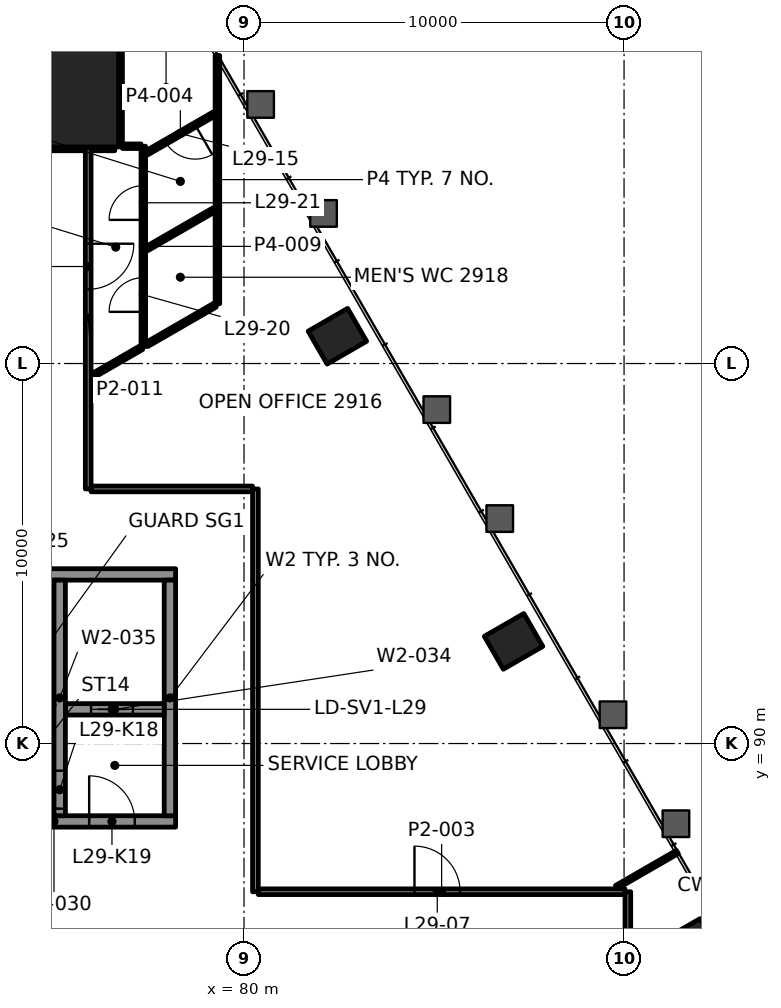
"""IFC4 building model, lengths in metres.
Left out: names, types, materials, properties, quantities, classifications, styles, units other than length and angle.
Written with IfcOpenShell. Run it as: python <this file> out.ifc"""

import sys

from ifc_helpers import new_model, si_unit, direction, frame, frame_2d, origin, origin_2d, place, context, subcontext, project, spatial, rectangle, extrude, element, fill, save


model = new_model("IFC4")
c1 = context("Model", 3, precision=1e-05, world=origin(), true_north=direction((0.0, 1.0)))
c2 = subcontext(c1, "Body", "Model", "MODEL_VIEW")
j1 = project(units=[si_unit("LENGTHUNIT", "METRE"), si_unit("PLANEANGLEUNIT", "RADIAN")], contexts=[c1])
p1 = place(None, origin())
s1 = spatial("IfcSite", under=j1, at=p1, CompositionType="ELEMENT")
p2 = place(p1, origin())
s2 = spatial("IfcBuilding", under=s1, at=p2, CompositionType="ELEMENT")
p3 = place(p2, frame((0.0, 0.0, 128.2)))
s3 = spatial("IfcBuildingStorey", under=s2, at=p3, CompositionType="ELEMENT", Elevation=128.2)
p4 = place(p3, frame((75.0, 107.399, 0.0), z_axis=(0.0, 0.0, 1.0), x_axis=(-1.0, 0.0, 0.0)))
e1 = element("IfcColumn", 1, at=p4, inside=s3, PredefinedType="COLUMN", context=c2, shape_type="SweptSolid", body=[
    extrude(rectangle(XDim=3.4, YDim=3.4, at=origin_2d()), origin(), (0.0, 0.0, 1.0), 4.2),
])
for number, where, z_axis, x_axis in (
    (2, (91.729, 84.658, -0.0), (0.0, 0.0, 1.0), (-0.5, 0.866, 0.0)),
    (3, (87.093, 92.688, -0.0), (0.0, 0.0, 1.0), (-0.5, 0.866, 0.0)),
    (4, (82.457, 100.719, -0.0), (0.0, 0.0, 1.0), (-0.5, 0.866, 0.0)),
):
    element("IfcColumn", number, at=place(p3, frame(where, z_axis=z_axis, x_axis=x_axis)), inside=s3, PredefinedType="COLUMN", context=c2, shape_type="SweptSolid", body=[
        extrude(rectangle(XDim=1.0, YDim=1.2, at=origin_2d()), origin(), (0.0, 0.0, 1.0), 4.2),
    ])
p5 = place(p3, frame((71.8, 87.95, 0.0), z_axis=(0.0, 0.0, 1.0), x_axis=(1.0, 0.0, 0.0)))
e5 = element("IfcWall", 5, at=p5, inside=s3, PredefinedType="SHEAR", context=c2, shape_type="SweptSolid", body=[
    extrude(rectangle(XDim=6.4, YDim=0.3, at=frame_2d((3.2, 0.0))), origin(), (0.0, 0.0, 1.0), 4.0),
])
p6 = place(p5, frame((1.325, 0.0, 0.0)))
e6 = element("IfcOpeningElement", 6, at=p6, cuts=e5, PredefinedType="OPENING", context=c2, shape_type="SweptSolid", body=[
    extrude(rectangle(XDim=1.0, YDim=2.1, at=frame_2d((0.5, 1.05))), frame((0.0, 0.16, 0.0), z_axis=(0.0, -1.0, 0.0), x_axis=(1.0, 0.0, 0.0)), (0.0, 0.0, 1.0), 0.32),
])
p7 = place(p5, frame((4.125, 0.0, 0.0)))
e7 = element("IfcOpeningElement", 7, at=p7, cuts=e5, PredefinedType="OPENING", context=c2, shape_type="SweptSolid", body=[
    extrude(rectangle(XDim=1.2, YDim=2.1, at=frame_2d((0.6, 1.05))), frame((0.0, 0.16, 0.0), z_axis=(0.0, -1.0, 0.0), x_axis=(1.0, 0.0, 0.0)), (0.0, 0.0, 1.0), 0.32),
])
p8 = place(p3, frame((71.8, 94.45, 0.0), z_axis=(0.0, 0.0, 1.0), x_axis=(1.0, 0.0, 0.0)))
e8 = element("IfcWall", 8, at=p8, inside=s3, PredefinedType="SHEAR", context=c2, shape_type="SweptSolid", body=[
    extrude(rectangle(XDim=6.4, YDim=0.3, at=frame_2d((3.2, 0.0))), origin(), (0.0, 0.0, 1.0), 4.0),
])
p9 = place(p3, frame((78.05, 88.1, 0.0), z_axis=(0.0, 0.0, 1.0), x_axis=(0.0, 1.0, 0.0)))
e9 = element("IfcWall", 9, at=p9, inside=s3, PredefinedType="SHEAR", context=c2, shape_type="SweptSolid", body=[
    extrude(rectangle(XDim=6.2, YDim=0.3, at=frame_2d((3.1, 0.0))), origin(), (0.0, 0.0, 1.0), 4.0),
])
p10 = place(p3, frame((75.3, 90.9, 0.0), z_axis=(0.0, 0.0, 1.0), x_axis=(1.0, 0.0, 0.0)))
e10 = element("IfcWall", 10, at=p10, inside=s3, PredefinedType="SHEAR", context=c2, shape_type="SweptSolid", body=[
    extrude(rectangle(XDim=2.6, YDim=0.3, at=frame_2d((1.3, 0.0))), origin(), (0.0, 0.0, 1.0), 4.0),
])
p11 = place(p10, frame((0.675, 0.0, 0.0)))
e11 = element("IfcOpeningElement", 11, at=p11, cuts=e10, PredefinedType="OPENING", context=c2, shape_type="SweptSolid", body=[
    extrude(rectangle(XDim=1.1, YDim=2.1, at=frame_2d((0.55, 1.05))), frame((0.0, 0.16, 0.0), z_axis=(0.0, -1.0, 0.0), x_axis=(1.0, 0.0, 0.0)), (0.0, 0.0, 1.0), 0.32),
])
p12 = place(p3, frame((75.15, 88.1, 0.0), z_axis=(0.0, 0.0, 1.0), x_axis=(0.0, 1.0, 0.0)))
e12 = element("IfcWall", 12, at=p12, inside=s3, PredefinedType="SHEAR", context=c2, shape_type="SweptSolid", body=[
    extrude(rectangle(XDim=6.2, YDim=0.3, at=frame_2d((3.1, 0.0))), origin(), (0.0, 0.0, 1.0), 4.0),
])
p13 = place(p12, frame((0.185, 0.0, 0.0)))
e13 = element("IfcOpeningElement", 13, at=p13, cuts=e12, PredefinedType="OPENING", context=c2, shape_type="SweptSolid", body=[
    extrude(rectangle(XDim=1.0, YDim=2.1, at=frame_2d((0.5, 1.05))), frame((0.0, 0.16, 0.0), z_axis=(0.0, -1.0, 0.0), x_axis=(1.0, 0.0, 0.0)), (0.0, 0.0, 1.0), 0.32),
])
p14 = place(p3, frame((80.375, 86.1, 0.0), z_axis=(0.0, 0.0, 1.0), x_axis=(1.0, 0.0, 0.0)))
e14 = element("IfcWall", 14, at=p14, inside=s3, PredefinedType="PARTITIONING", context=c2, shape_type="SweptSolid", body=[
    extrude(rectangle(XDim=9.649, YDim=0.15, at=frame_2d((4.825, 0.0))), origin(), (0.0, 0.0, 1.0), 3.4),
])
p15 = place(p14, frame((4.11, 0.0, 0.0)))
e15 = element("IfcOpeningElement", 15, at=p15, cuts=e14, PredefinedType="OPENING", context=c2, shape_type="SweptSolid", body=[
    extrude(rectangle(XDim=1.2, YDim=2.1, at=frame_2d((0.6, 1.05))), frame((0.0, 0.085, 0.0), z_axis=(0.0, -1.0, 0.0), x_axis=(1.0, 0.0, 0.0)), (0.0, 0.0, 1.0), 0.17),
])
p16 = place(p3, frame((75.975, 96.7, 0.0), z_axis=(0.0, 0.0, 1.0), x_axis=(1.0, 0.0, 0.0)))
e16 = element("IfcWall", 16, at=p16, inside=s3, PredefinedType="PARTITIONING", context=c2, shape_type="SweptSolid", body=[
    extrude(rectangle(XDim=4.249, YDim=0.15, at=frame_2d((2.125, 0.0))), origin(), (0.0, 0.0, 1.0), 3.4),
])
p17 = place(p3, frame((74.176, 105.699, 0.0), z_axis=(0.0, 0.0, 1.0), x_axis=(1.0, 0.0, 0.0)))
e17 = element("IfcWall", 17, at=p17, inside=s3, PredefinedType="PARTITIONING", context=c2, shape_type="SweptSolid", body=[
    extrude(rectangle(XDim=1.649, YDim=0.2, at=frame_2d((0.825, 0.0))), origin(), (0.0, 0.0, 1.0), 3.397),
])
p18 = place(p3, frame((76.8, 105.718, 0.0), z_axis=(0.0, 0.0, 1.0), x_axis=(1.0, 0.0, 0.0)))
e18 = element("IfcWall", 18, at=p18, inside=s3, PredefinedType="PARTITIONING", context=c2, shape_type="SweptSolid", body=[
    extrude(rectangle(XDim=0.49, YDim=0.12, at=frame_2d((0.245, 0.0))), origin(), (0.0, 0.0, 1.0), 3.4),
])
p19 = place(p3, frame((89.797, 86.22, 0.0), z_axis=(0.0, 0.0, 1.0), x_axis=(0.866036320872, 0.499981090573, 0.0)))
e19 = element("IfcWall", 19, at=p19, inside=s3, PredefinedType="PARTITIONING", context=c2, shape_type="SweptSolid", body=[
    extrude(rectangle(XDim=1.852, YDim=0.1, at=frame_2d((0.926, 0.0))), origin(), (0.0, 0.0, 1.0), 3.165),
])
p20 = place(p3, frame((76.01, 99.673, 0.0), z_axis=(0.0, 0.0, 1.0), x_axis=(0.865943626461, 0.500141615736, 0.0)))
e20 = element("IfcWall", 20, at=p20, inside=s3, PredefinedType="PARTITIONING", context=c2, shape_type="SweptSolid", body=[
    extrude(rectangle(XDim=1.496, YDim=0.12, at=frame_2d((0.748, 0.0))), origin(), (0.0, 0.0, 1.0), 3.4),
])
p21 = place(p3, frame((77.445, 103.024, 0.0), z_axis=(0.0, 0.0, 1.0), x_axis=(0.866039589866, 0.499975428181, 0.0)))
e21 = element("IfcWall", 21, at=p21, inside=s3, PredefinedType="PARTITIONING", context=c2, shape_type="SweptSolid", body=[
    extrude(rectangle(XDim=2.033, YDim=0.12, at=frame_2d((1.016, 0.0))), origin(), (0.0, 0.0, 1.0), 3.4),
])
p22 = place(p3, frame((79.205, 106.562, 0.0), z_axis=(0.0, 0.0, 1.0), x_axis=(-0.866017611601, -0.500013496215, 0.0)))
e22 = element("IfcWall", 22, at=p22, inside=s3, PredefinedType="PARTITIONING", context=c2, shape_type="SweptSolid", body=[
    extrude(rectangle(XDim=2.033, YDim=0.12, at=frame_2d((1.017, 0.0))), origin(), (0.0, 0.0, 1.0), 3.4),
])
p23 = place(p22, frame((0.567, 0.0, 0.0)))
e23 = element("IfcOpeningElement", 23, at=p23, cuts=e22, PredefinedType="OPENING", context=c2, shape_type="SweptSolid", body=[
    extrude(rectangle(XDim=0.9, YDim=2.1, at=frame_2d((0.45, 1.05))), frame((0.0, 0.07, 0.0), z_axis=(0.0, -1.0, 0.0), x_axis=(1.0, 0.0, 0.0)), (0.0, 0.0, 1.0), 0.14),
])
p24 = place(p3, frame((90.1, 86.1, 0.0), z_axis=(0.0, 0.0, 1.0), x_axis=(0.0, -1.0, 0.0)))
e24 = element("IfcWall", 24, at=p24, inside=s3, PredefinedType="PARTITIONING", context=c2, shape_type="SweptSolid", body=[
    extrude(rectangle(XDim=18.778, YDim=0.15, at=frame_2d((9.389, 0.0))), origin(), (0.0, 0.0, 1.0), 3.4),
])
p25 = place(p24, frame((6.196, 0.0, 0.0)))
e25 = element("IfcOpeningElement", 25, at=p25, cuts=e24, PredefinedType="OPENING", context=c2, shape_type="SweptSolid", body=[
    extrude(rectangle(XDim=0.9, YDim=2.1, at=frame_2d((0.45, 1.05))), frame((0.0, 0.085, 0.0), z_axis=(0.0, -1.0, 0.0), x_axis=(1.0, 0.0, 0.0)), (0.0, 0.0, 1.0), 0.17),
])
p26 = place(p24, frame((15.332, 0.0, 0.0)))
e26 = element("IfcOpeningElement", 26, at=p26, cuts=e24, PredefinedType="OPENING", context=c2, shape_type="SweptSolid", body=[
    extrude(rectangle(XDim=1.0, YDim=2.1, at=frame_2d((0.5, 1.05))), frame((0.0, 0.085, 0.0), z_axis=(0.0, -1.0, 0.0), x_axis=(1.0, 0.0, 0.0)), (0.0, 0.0, 1.0), 0.17),
])
p27 = place(p3, frame((80.3, 86.1, 0.0), z_axis=(0.0, 0.0, 1.0), x_axis=(0.0, 1.0, 0.0)))
e27 = element("IfcWall", 27, at=p27, inside=s3, PredefinedType="PARTITIONING", context=c2, shape_type="SweptSolid", body=[
    extrude(rectangle(XDim=10.599, YDim=0.15, at=frame_2d((5.3, 0.0))), origin(), (0.0, 0.0, 1.0), 3.322),
])
p28 = place(p3, frame((79.3, 101.573, 0.0), z_axis=(0.0, 0.0, 1.0), x_axis=(0.0, 1.0, 0.0)))
e28 = element("IfcWall", 28, at=p28, inside=s3, PredefinedType="PARTITIONING", context=c2, shape_type="SweptSolid", body=[
    extrude(rectangle(XDim=6.533, YDim=0.12, at=frame_2d((3.267, 0.0))), origin(), (0.0, 0.0, 1.0), 3.4),
])
p29 = place(p3, frame((77.35, 100.447, 0.0), z_axis=(0.0, 0.0, 1.0), x_axis=(0.0, 1.0, 0.0)))
e29 = element("IfcWall", 29, at=p29, inside=s3, PredefinedType="PARTITIONING", context=c2, shape_type="SweptSolid", body=[
    extrude(rectangle(XDim=5.271, YDim=0.12, at=frame_2d((2.635, 0.0))), origin(), (0.0, 0.0, 1.0), 3.4),
])
p30 = place(p29, frame((0.913, 0.0, 0.0)))
e30 = element("IfcOpeningElement", 30, at=p30, cuts=e29, PredefinedType="OPENING", context=c2, shape_type="SweptSolid", body=[
    extrude(rectangle(XDim=0.9, YDim=2.1, at=frame_2d((0.45, 1.05))), frame((0.0, 0.07, 0.0), z_axis=(0.0, -1.0, 0.0), x_axis=(1.0, 0.0, 0.0)), (0.0, 0.0, 1.0), 0.14),
])
p31 = place(p29, frame((3.333, 0.0, 0.0)))
e31 = element("IfcOpeningElement", 31, at=p31, cuts=e29, PredefinedType="OPENING", context=c2, shape_type="SweptSolid", body=[
    extrude(rectangle(XDim=0.9, YDim=2.1, at=frame_2d((0.45, 1.05))), frame((0.0, 0.07, 0.0), z_axis=(0.0, -1.0, 0.0), x_axis=(1.0, 0.0, 0.0)), (0.0, 0.0, 1.0), 0.14),
])
p32 = place(p3, frame((76.7, 105.715, 0.0), z_axis=(0.0, 0.0, 1.0), x_axis=(0.0, 1.0, 0.0)))
e32 = element("IfcWall", 32, at=p32, inside=s3, PredefinedType="PARTITIONING", context=c2, shape_type="SweptSolid", body=[
    extrude(rectangle(XDim=3.543, YDim=0.2, at=frame_2d((1.772, 0.0))), origin(), (0.0, 0.0, 1.0), 3.4),
])
p33 = place(p3, frame((75.9, 105.698, 0.0), z_axis=(0.0, 0.0, 1.0), x_axis=(0.0, -1.0, 0.0)))
e33 = element("IfcWall", 33, at=p33, inside=s3, PredefinedType="PARTITIONING", context=c2, shape_type="SweptSolid", body=[
    extrude(rectangle(XDim=8.999, YDim=0.15, at=frame_2d((4.499, 0.0))), origin(), (0.0, 0.0, 1.0), 3.4),
])
p34 = place(p33, frame((2.546, 0.0, 0.0)))
e34 = element("IfcOpeningElement", 34, at=p34, cuts=e33, PredefinedType="OPENING", context=c2, shape_type="SweptSolid", body=[
    extrude(rectangle(XDim=1.2, YDim=2.1, at=frame_2d((0.6, 1.05))), frame((0.0, 0.085, 0.0), z_axis=(0.0, -1.0, 0.0), x_axis=(1.0, 0.0, 0.0)), (0.0, 0.0, 1.0), 0.17),
])
p35 = place(p3, frame((75.975, 105.699, 0.0), z_axis=(0.0, 0.0, 1.0), x_axis=(1.0, 0.0, 0.0)))
e35 = element("IfcWall", 35, at=p35, inside=s3, PredefinedType="PARTITIONING", context=c2, shape_type="SweptSolid", body=[
    extrude(rectangle(XDim=0.625, YDim=0.2, at=frame_2d((0.312, 0.0))), origin(), (0.0, 0.0, 1.0), 3.4),
])
p36 = place(p3, frame((77.44, 100.499, 0.0), z_axis=(0.0, 0.0, 1.0), x_axis=(0.865986040326, 0.500068173313, 0.0)))
e36 = element("IfcWall", 36, at=p36, inside=s3, PredefinedType="PARTITIONING", context=c2, shape_type="SweptSolid", body=[
    extrude(rectangle(XDim=2.078, YDim=0.12, at=frame_2d((1.039, 0.0))), origin(), (0.0, 0.0, 1.0), 3.4),
])
p37 = place(p15, origin())
e37 = element("IfcDoor", 37, at=p37, inside=s3, OperationType="DOUBLE_DOOR_SINGLE_SWING", PredefinedType="DOOR", context=c2, shape_type="SweptSolid", body=[
    extrude(rectangle(XDim=1.2, YDim=2.1, at=frame_2d((0.6, 1.05))), frame((0.0, 0.025, 0.0), z_axis=(0.0, -1.0, 0.0), x_axis=(1.0, 0.0, 0.0)), (0.0, 0.0, 1.0), 0.05),
])
fill(e15, e37)
p38 = place(p23, origin())
e38 = element("IfcDoor", 38, at=p38, inside=s3, OperationType="SINGLE_SWING_RIGHT", PredefinedType="DOOR", context=c2, shape_type="SweptSolid", body=[
    extrude(rectangle(XDim=0.9, YDim=2.1, at=frame_2d((0.45, 1.05))), frame((0.0, 0.025, 0.0), z_axis=(0.0, -1.0, 0.0), x_axis=(1.0, 0.0, 0.0)), (0.0, 0.0, 1.0), 0.05),
])
fill(e23, e38)
p39 = place(p30, origin())
e39 = element("IfcDoor", 39, at=p39, inside=s3, OperationType="SINGLE_SWING_LEFT", PredefinedType="DOOR", context=c2, shape_type="SweptSolid", body=[
    extrude(rectangle(XDim=0.9, YDim=2.1, at=frame_2d((0.45, 1.05))), frame((0.0, 0.025, 0.0), z_axis=(0.0, -1.0, 0.0), x_axis=(1.0, 0.0, 0.0)), (0.0, 0.0, 1.0), 0.05),
])
fill(e30, e39)
p40 = place(p31, origin())
e40 = element("IfcDoor", 40, at=p40, inside=s3, OperationType="SINGLE_SWING_RIGHT", PredefinedType="DOOR", context=c2, shape_type="SweptSolid", body=[
    extrude(rectangle(XDim=0.9, YDim=2.1, at=frame_2d((0.45, 1.05))), frame((0.0, 0.025, 0.0), z_axis=(0.0, -1.0, 0.0), x_axis=(1.0, 0.0, 0.0)), (0.0, 0.0, 1.0), 0.05),
])
fill(e31, e40)
p41 = place(p34, origin())
e41 = element("IfcDoor", 41, at=p41, inside=s3, OperationType="DOUBLE_DOOR_SINGLE_SWING", PredefinedType="DOOR", context=c2, shape_type="SweptSolid", body=[
    extrude(rectangle(XDim=1.2, YDim=2.1, at=frame_2d((0.6, 1.05))), frame((0.0, 0.025, 0.0), z_axis=(0.0, -1.0, 0.0), x_axis=(1.0, 0.0, 0.0)), (0.0, 0.0, 1.0), 0.05),
])
fill(e34, e41)
p42 = place(p11, origin())
e42 = element("IfcDoor", 42, at=p42, inside=s3, OperationType="DOUBLE_DOOR_SLIDING", PredefinedType="DOOR", context=c2, shape_type="SweptSolid", body=[
    extrude(rectangle(XDim=1.1, YDim=2.1, at=frame_2d((0.55, 1.05))), frame((0.0, 0.025, 0.0), z_axis=(0.0, -1.0, 0.0), x_axis=(1.0, 0.0, 0.0)), (0.0, 0.0, 1.0), 0.05),
])
fill(e11, e42)
p43 = place(p13, origin())
e43 = element("IfcDoor", 43, at=p43, inside=s3, OperationType="SINGLE_SWING_LEFT", PredefinedType="DOOR", context=c2, shape_type="SweptSolid", body=[
    extrude(rectangle(XDim=1.0, YDim=2.1, at=frame_2d((0.5, 1.05))), frame((0.0, 0.025, 0.0), z_axis=(0.0, -1.0, 0.0), x_axis=(1.0, 0.0, 0.0)), (0.0, 0.0, 1.0), 0.05),
])
fill(e13, e43)
p44 = place(p7, origin())
e44 = element("IfcDoor", 44, at=p44, inside=s3, OperationType="SINGLE_SWING_RIGHT", PredefinedType="DOOR", context=c2, shape_type="SweptSolid", body=[
    extrude(rectangle(XDim=1.2, YDim=2.1, at=frame_2d((0.6, 1.05))), frame((0.0, 0.025, 0.0), z_axis=(0.0, -1.0, 0.0), x_axis=(1.0, 0.0, 0.0)), (0.0, 0.0, 1.0), 0.05),
])
fill(e7, e44)
save(model, sys.argv[1])
